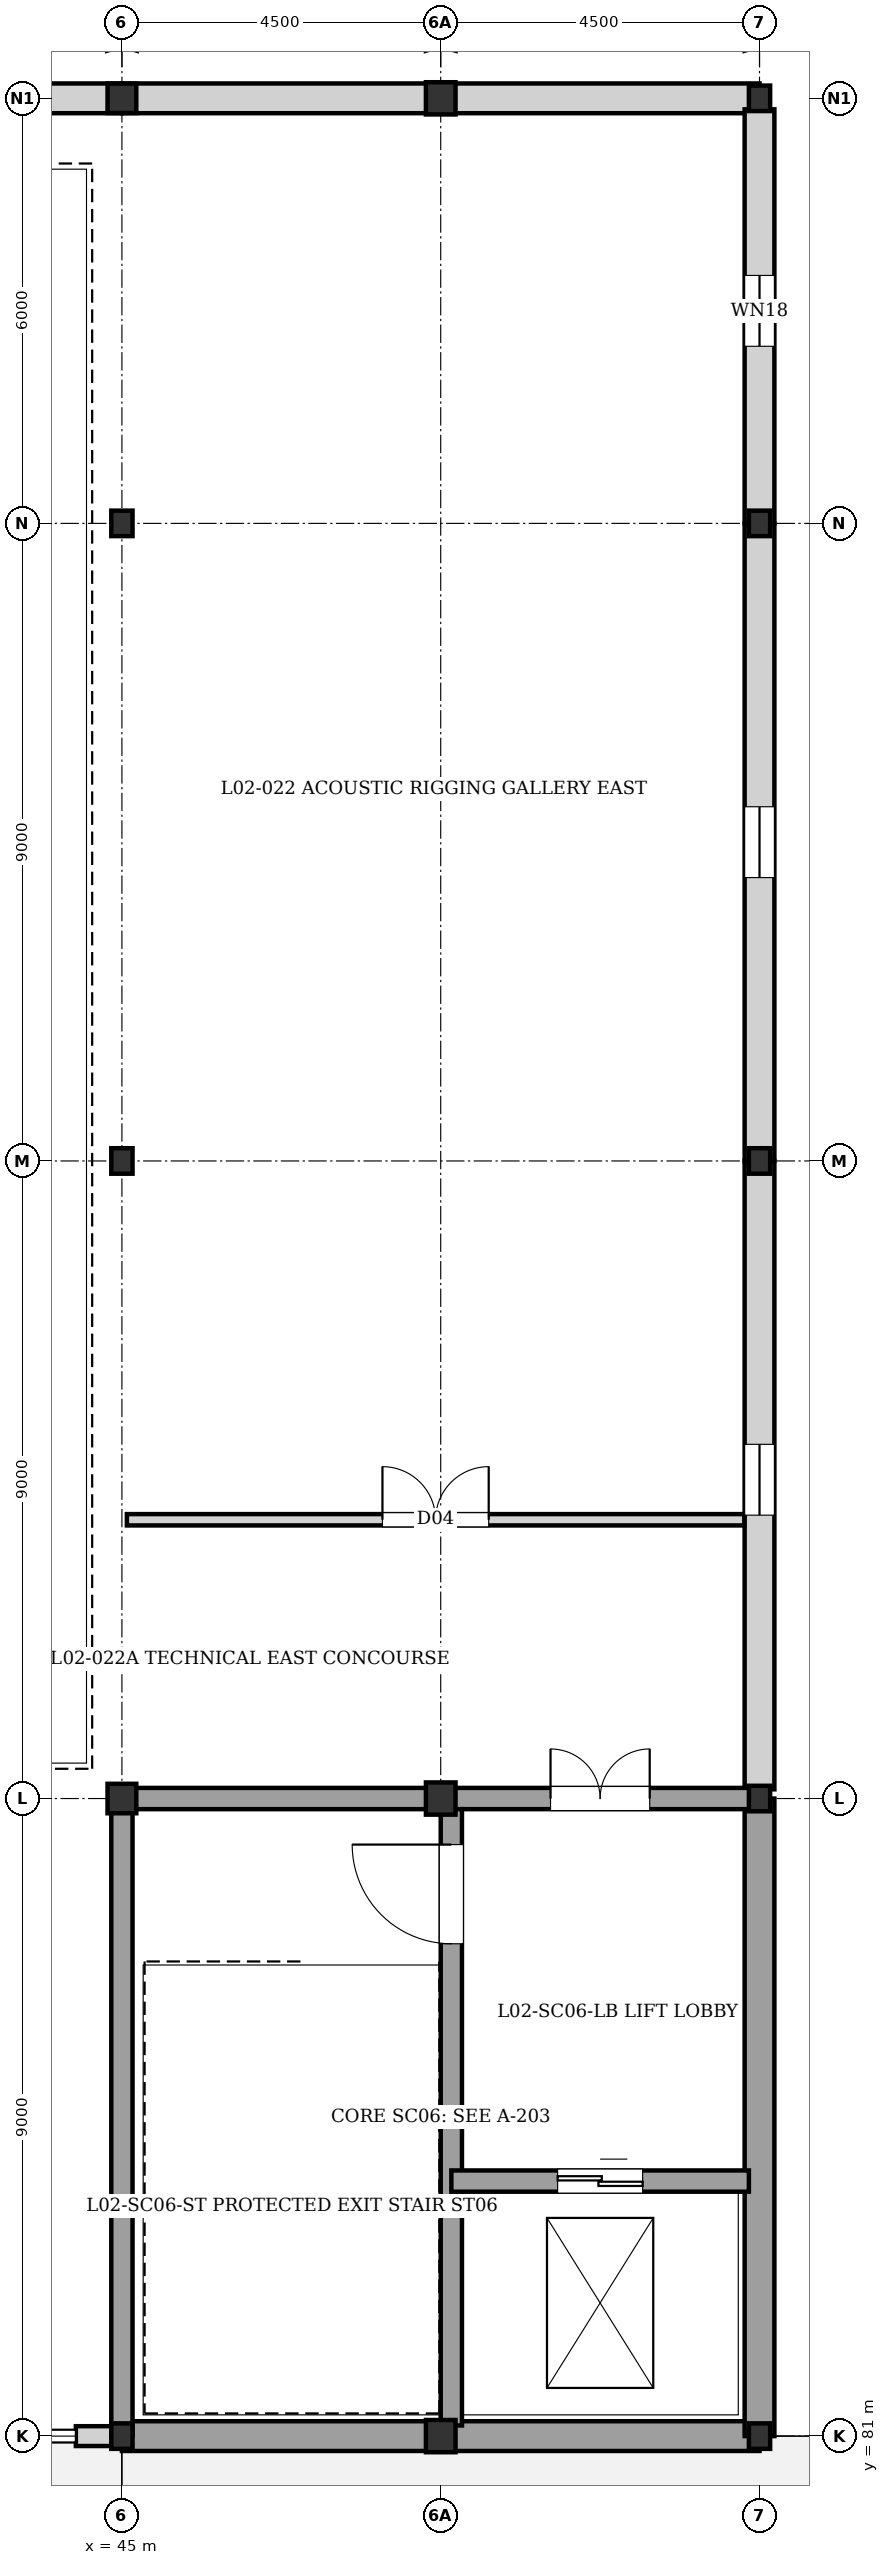
"""IFC4 building model, lengths in metres.
Left out: names, types, materials, properties, quantities, classifications, styles, units other than length and angle.
Written with IfcOpenShell. Run it as: python <this file> out.ifc"""

import sys

from ifc_helpers import new_model, si_unit, direction, frame, frame_2d, origin, origin_2d, place, context, subcontext, project, spatial, rectangle, i_section, extrude, element, fill, save


model = new_model("IFC4")
c1 = context("Model", 3, precision=1e-05, world=origin(), true_north=direction((0.0, 1.0)))
c2 = subcontext(c1, "Body", "Model", "MODEL_VIEW")
j1 = project(units=[si_unit("LENGTHUNIT", "METRE"), si_unit("PLANEANGLEUNIT", "RADIAN")], contexts=[c1])
p1 = place(None, origin())
s1 = spatial("IfcSite", under=j1, at=p1, CompositionType="ELEMENT")
p2 = place(p1, origin())
s2 = spatial("IfcBuilding", under=s1, at=p2, CompositionType="ELEMENT")
p3 = place(p2, frame((0.0, 0.0, 8.16)))
s3 = spatial("IfcBuildingStorey", under=s2, at=p3, CompositionType="ELEMENT", Elevation=8.16)
p4 = place(p3, frame((45.0, 81.0, 0.0), z_axis=(0.0, 0.0, 1.0), x_axis=(1.0, 0.0, 0.0)))
e1 = element("IfcColumn", 1, at=p4, inside=s3, PredefinedType="COLUMN", context=c2, shape_type="SweptSolid", body=[
    extrude(i_section(OverallWidth=0.3, OverallDepth=0.36, WebThickness=0.012, FlangeThickness=0.022, at=origin_2d()), origin(), (0.0, 0.0, 1.0), 3.36),
])
p5 = place(p3, frame((45.0, 90.0, 0.0), z_axis=(0.0, 0.0, 1.0), x_axis=(1.0, 0.0, 0.0)))
e2 = element("IfcColumn", 2, at=p5, inside=s3, PredefinedType="COLUMN", context=c2, shape_type="SweptSolid", body=[
    extrude(i_section(OverallWidth=0.406, OverallDepth=0.416, WebThickness=0.022, FlangeThickness=0.038, at=origin_2d()), origin(), (0.0, 0.0, 1.0), 3.36),
])
for number, where, z_axis, x_axis in (
    (3, (45.0, 99.0, 0.0), (0.0, 0.0, 1.0), (1.0, 0.0, 0.0)),
    (4, (45.0, 108.0, 0.0), (0.0, 0.0, 1.0), (1.0, 0.0, 0.0)),
):
    element("IfcColumn", number, at=place(p3, frame(where, z_axis=z_axis, x_axis=x_axis)), inside=s3, PredefinedType="COLUMN", context=c2, shape_type="SweptSolid", body=[
        extrude(i_section(OverallWidth=0.3, OverallDepth=0.36, WebThickness=0.012, FlangeThickness=0.022, at=origin_2d()), origin(), (0.0, 0.0, 1.0), 3.36),
    ])
p6 = place(p3, frame((45.0, 114.0, 0.0), z_axis=(0.0, 0.0, 1.0), x_axis=(1.0, 0.0, 0.0)))
e5 = element("IfcColumn", 5, at=p6, inside=s3, PredefinedType="COLUMN", context=c2, shape_type="SweptSolid", body=[
    extrude(i_section(OverallWidth=0.406, OverallDepth=0.416, WebThickness=0.022, FlangeThickness=0.038, at=origin_2d()), origin(), (0.0, 0.0, 1.0), 3.36),
])
for number, where, z_axis, x_axis in (
    (6, (54.0, 81.0, 0.0), (0.0, 0.0, 1.0), (1.0, 0.0, 0.0)),
    (7, (54.0, 90.0, 0.0), (0.0, 0.0, 1.0), (1.0, 0.0, 0.0)),
    (8, (54.0, 99.0, 0.0), (0.0, 0.0, 1.0), (1.0, 0.0, 0.0)),
    (9, (54.0, 108.0, 0.0), (0.0, 0.0, 1.0), (1.0, 0.0, 0.0)),
    (10, (54.0, 114.0, 0.0), (0.0, 0.0, 1.0), (1.0, 0.0, 0.0)),
):
    element("IfcColumn", number, at=place(p3, frame(where, z_axis=z_axis, x_axis=x_axis)), inside=s3, PredefinedType="COLUMN", context=c2, shape_type="SweptSolid", body=[
        extrude(i_section(OverallWidth=0.3, OverallDepth=0.36, WebThickness=0.012, FlangeThickness=0.022, at=origin_2d()), origin(), (0.0, 0.0, 1.0), 3.36),
    ])
for number, where, z_axis, x_axis in (
    (11, (49.5, 81.0, 2.82), (0.0, 0.0, 1.0), (1.0, 0.0, 0.0)),
    (12, (49.5, 90.0, 2.82), (0.0, 0.0, 1.0), (1.0, 0.0, 0.0)),
    (13, (49.5, 114.0, 2.82), (0.0, 0.0, 1.0), (1.0, 0.0, 0.0)),
):
    element("IfcColumn", number, at=place(p3, frame(where, z_axis=z_axis, x_axis=x_axis)), inside=s3, PredefinedType="COLUMN", context=c2, shape_type="SweptSolid", body=[
        extrude(i_section(OverallWidth=0.418, OverallDepth=0.455, WebThickness=0.032, FlangeThickness=0.056, at=origin_2d()), origin(), (0.0, 0.0, 1.0), 1.005),
    ])
p7 = place(p3, frame((54.0, 81.0, 0.0), z_axis=(0.0, 0.0, 1.0), x_axis=(-1.0, 0.0, 0.0)))
e14 = element("IfcWall", 14, at=p7, inside=s3, PredefinedType="SOLIDWALL", context=c2, shape_type="SweptSolid", body=[
    extrude(rectangle(XDim=9.0, YDim=0.42, at=frame_2d((4.5, 0.0))), origin(), (0.0, 0.0, 1.0), 3.11),
])
p8 = place(p3, frame((44.87, 81.0, 0.0), z_axis=(0.0, 0.0, 1.0), x_axis=(-1.0, 0.0, 0.0)))
e15 = element("IfcWall", 15, at=p8, inside=s3, PredefinedType="SOLIDWALL", context=c2, shape_type="SweptSolid", body=[
    extrude(rectangle(XDim=0.52, YDim=0.28, at=frame_2d((0.26, 0.0))), origin(), (0.0, 0.0, 1.0), 2.035),
])
for number, where, z_axis, x_axis in (
    (16, (36.0, 114.0, 0.0), (0.0, 0.0, 1.0), (1.0, 0.0, 0.0)),
    (17, (45.0, 114.0, 0.0), (0.0, 0.0, 1.0), (1.0, 0.0, 0.0)),
):
    element("IfcWall", number, at=place(p3, frame(where, z_axis=z_axis, x_axis=x_axis)), inside=s3, PredefinedType="SOLIDWALL", context=c2, shape_type="SweptSolid", body=[
        extrude(rectangle(XDim=9.0, YDim=0.42, at=frame_2d((4.5, 0.0))), origin(), (0.0, 0.0, 1.0), 2.035),
    ])
p9 = place(p3, frame((54.0, 113.845, 0.0), z_axis=(0.0, 0.0, 1.0), x_axis=(0.0, -1.0, 0.0)))
e18 = element("IfcWall", 18, at=p9, inside=s3, PredefinedType="SOLIDWALL", context=c2, shape_type="SweptSolid", body=[
    extrude(rectangle(XDim=5.845, YDim=0.42, at=frame_2d((2.922, 0.0))), origin(), (0.0, 0.0, 1.0), 2.8),
])
p10 = place(p9, frame((2.345, 0.0, 0.4)))
e19 = element("IfcOpeningElement", 19, at=p10, cuts=e18, PredefinedType="OPENING", context=c2, shape_type="SweptSolid", body=[
    extrude(rectangle(XDim=1.0, YDim=1.6, at=frame_2d((0.5, 0.8))), frame((0.0, 0.22, 0.0), z_axis=(0.0, -1.0, 0.0), x_axis=(1.0, 0.0, 0.0)), (0.0, 0.0, 1.0), 0.44),
])
p11 = place(p3, frame((54.0, 108.0, 0.0), z_axis=(0.0, 0.0, 1.0), x_axis=(0.0, -1.0, 0.0)))
e20 = element("IfcWall", 20, at=p11, inside=s3, PredefinedType="SOLIDWALL", context=c2, shape_type="SweptSolid", body=[
    extrude(rectangle(XDim=9.0, YDim=0.42, at=frame_2d((4.5, 0.0))), origin(), (0.0, 0.0, 1.0), 3.11),
])
p12 = place(p11, frame((4.0, 0.0, 0.4)))
e21 = element("IfcOpeningElement", 21, at=p12, cuts=e20, PredefinedType="OPENING", context=c2, shape_type="SweptSolid", body=[
    extrude(rectangle(XDim=1.0, YDim=1.6, at=frame_2d((0.5, 0.8))), frame((0.0, 0.22, 0.0), z_axis=(0.0, -1.0, 0.0), x_axis=(1.0, 0.0, 0.0)), (0.0, 0.0, 1.0), 0.44),
])
p13 = place(p3, frame((54.0, 99.0, 0.0), z_axis=(0.0, 0.0, 1.0), x_axis=(0.0, -1.0, 0.0)))
e22 = element("IfcWall", 22, at=p13, inside=s3, PredefinedType="SOLIDWALL", context=c2, shape_type="SweptSolid", body=[
    extrude(rectangle(XDim=8.87, YDim=0.42, at=frame_2d((4.435, 0.0))), origin(), (0.0, 0.0, 1.0), 2.7),
])
p14 = place(p13, frame((4.0, 0.0, 0.4)))
e23 = element("IfcOpeningElement", 23, at=p14, cuts=e22, PredefinedType="OPENING", context=c2, shape_type="SweptSolid", body=[
    extrude(rectangle(XDim=1.0, YDim=1.6, at=frame_2d((0.5, 0.8))), frame((0.0, 0.22, 0.0), z_axis=(0.0, -1.0, 0.0), x_axis=(1.0, 0.0, 0.0)), (0.0, 0.0, 1.0), 0.44),
])
p15 = place(p3, frame((54.0, 90.0, 0.0), z_axis=(0.0, 0.0, 1.0), x_axis=(0.0, -1.0, 0.0)))
e24 = element("IfcWall", 24, at=p15, inside=s3, PredefinedType="SOLIDWALL", context=c2, shape_type="SweptSolid", body=[
    extrude(rectangle(XDim=9.0, YDim=0.42, at=frame_2d((4.5, 0.0))), origin(), (0.0, 0.0, 1.0), 3.11),
])
p16 = place(p3, frame((45.0, 90.0, 0.0), z_axis=(0.0, 0.0, 1.0), x_axis=(1.0, 0.0, 0.0)))
e25 = element("IfcWall", 25, at=p16, inside=s3, PredefinedType="SHEAR", context=c2, shape_type="SweptSolid", body=[
    extrude(rectangle(XDim=9.0, YDim=0.3, at=frame_2d((4.5, 0.0))), origin(), (0.0, 0.0, 1.0), 3.11),
])
p17 = place(p16, frame((6.05, 0.0, 0.0)))
e26 = element("IfcOpeningElement", 26, at=p17, cuts=e25, PredefinedType="OPENING", context=c2, shape_type="SweptSolid", body=[
    extrude(rectangle(XDim=1.4, YDim=2.02, at=frame_2d((0.7, 1.01))), frame((0.0, 0.16, 0.0), z_axis=(0.0, -1.0, 0.0), x_axis=(1.0, 0.0, 0.0)), (0.0, 0.0, 1.0), 0.32),
])
p18 = place(p3, frame((45.0, 81.0, 0.0), z_axis=(0.0, 0.0, 1.0), x_axis=(0.0, 1.0, 0.0)))
e27 = element("IfcWall", 27, at=p18, inside=s3, PredefinedType="SHEAR", context=c2, shape_type="SweptSolid", body=[
    extrude(rectangle(XDim=9.0, YDim=0.3, at=frame_2d((4.5, 0.0))), origin(), (0.0, 0.0, 1.0), 3.11),
])
p19 = place(p3, frame((49.65, 81.15, 0.0), z_axis=(0.0, 0.0, 1.0), x_axis=(0.0, 1.0, 0.0)))
e28 = element("IfcWall", 28, at=p19, inside=s3, PredefinedType="SHEAR", context=c2, shape_type="SweptSolid", body=[
    extrude(rectangle(XDim=8.7, YDim=0.3, at=frame_2d((4.35, 0.0))), origin(), (0.0, 0.0, 1.0), 3.11),
])
p20 = place(p19, frame((6.8, 0.0, 0.0)))
e29 = element("IfcOpeningElement", 29, at=p20, cuts=e28, PredefinedType="OPENING", context=c2, shape_type="SweptSolid", body=[
    extrude(rectangle(XDim=1.4, YDim=2.02, at=frame_2d((0.7, 1.01))), frame((0.0, 0.16, 0.0), z_axis=(0.0, -1.0, 0.0), x_axis=(1.0, 0.0, 0.0)), (0.0, 0.0, 1.0), 0.32),
])
p21 = place(p3, frame((49.65, 84.6, 0.0), z_axis=(0.0, 0.0, 1.0), x_axis=(1.0, 0.0, 0.0)))
e30 = element("IfcWall", 30, at=p21, inside=s3, PredefinedType="SHEAR", context=c2, shape_type="SweptSolid", body=[
    extrude(rectangle(XDim=4.2, YDim=0.3, at=frame_2d((2.1, 0.0))), origin(), (0.0, 0.0, 1.0), 3.11),
])
p22 = place(p21, frame((1.5, 0.0, 0.0)))
e31 = element("IfcOpeningElement", 31, at=p22, cuts=e30, PredefinedType="OPENING", context=c2, shape_type="SweptSolid", body=[
    extrude(rectangle(XDim=1.2, YDim=2.2, at=frame_2d((0.6, 1.1))), frame((0.0, 0.16, 0.0), z_axis=(0.0, -1.0, 0.0), x_axis=(1.0, 0.0, 0.0)), (0.0, 0.0, 1.0), 0.32),
])
p23 = place(p3, frame((45.07, 93.935, 0.0), z_axis=(0.0, 0.0, 1.0), x_axis=(1.0, 0.0, 0.0)))
e32 = element("IfcWall", 32, at=p23, inside=s3, PredefinedType="PARTITIONING", context=c2, shape_type="SweptSolid", body=[
    extrude(rectangle(XDim=8.715, YDim=0.16, at=frame_2d((4.357, 0.0))), origin(), (0.0, 0.0, 1.0), 3.11),
])
p24 = place(p23, frame((3.607, 0.0, 0.0)))
e33 = element("IfcOpeningElement", 33, at=p24, cuts=e32, PredefinedType="OPENING", context=c2, shape_type="SweptSolid", body=[
    extrude(rectangle(XDim=1.5, YDim=2.1, at=frame_2d((0.75, 1.05))), frame((0.0, 0.09, 0.0), z_axis=(0.0, -1.0, 0.0), x_axis=(1.0, 0.0, 0.0)), (0.0, 0.0, 1.0), 0.18),
])
p25 = place(p10, origin())
e34 = element("IfcWindow", 34, at=p25, inside=s3, PartitioningType="SINGLE_PANEL", PredefinedType="WINDOW", context=c2, shape_type="SweptSolid", body=[
    extrude(rectangle(XDim=1.0, YDim=1.6, at=frame_2d((0.5, 0.8))), frame((0.0, 0.03, 0.0), z_axis=(0.0, -1.0, 0.0), x_axis=(1.0, 0.0, 0.0)), (0.0, 0.0, 1.0), 0.06),
])
fill(e19, e34)
p26 = place(p12, origin())
e35 = element("IfcWindow", 35, at=p26, inside=s3, PartitioningType="SINGLE_PANEL", PredefinedType="WINDOW", context=c2, shape_type="SweptSolid", body=[
    extrude(rectangle(XDim=1.0, YDim=1.6, at=frame_2d((0.5, 0.8))), frame((0.0, 0.03, 0.0), z_axis=(0.0, -1.0, 0.0), x_axis=(1.0, 0.0, 0.0)), (0.0, 0.0, 1.0), 0.06),
])
fill(e21, e35)
p27 = place(p14, origin())
e36 = element("IfcWindow", 36, at=p27, inside=s3, PartitioningType="SINGLE_PANEL", PredefinedType="WINDOW", context=c2, shape_type="SweptSolid", body=[
    extrude(rectangle(XDim=1.0, YDim=1.6, at=frame_2d((0.5, 0.8))), frame((0.0, 0.03, 0.0), z_axis=(0.0, -1.0, 0.0), x_axis=(1.0, 0.0, 0.0)), (0.0, 0.0, 1.0), 0.06),
])
fill(e23, e36)
p28 = place(p17, origin())
e37 = element("IfcDoor", 37, at=p28, inside=s3, OperationType="DOUBLE_DOOR_SINGLE_SWING", PredefinedType="DOOR", context=c2, shape_type="SweptSolid", body=[
    extrude(rectangle(XDim=1.4, YDim=2.02, at=frame_2d((0.7, 1.01))), frame((0.0, 0.025, 0.0), z_axis=(0.0, -1.0, 0.0), x_axis=(1.0, 0.0, 0.0)), (0.0, 0.0, 1.0), 0.05),
])
fill(e26, e37)
p29 = place(p20, origin())
e38 = element("IfcDoor", 38, at=p29, inside=s3, OperationType="SINGLE_SWING_RIGHT", PredefinedType="DOOR", context=c2, shape_type="SweptSolid", body=[
    extrude(rectangle(XDim=1.4, YDim=2.02, at=frame_2d((0.7, 1.01))), frame((0.0, 0.025, 0.0), z_axis=(0.0, -1.0, 0.0), x_axis=(1.0, 0.0, 0.0)), (0.0, 0.0, 1.0), 0.05),
])
fill(e29, e38)
p30 = place(p22, origin())
e39 = element("IfcDoor", 39, at=p30, inside=s3, OperationType="DOUBLE_DOOR_SLIDING", PredefinedType="DOOR", context=c2, shape_type="SweptSolid", body=[
    extrude(rectangle(XDim=1.2, YDim=2.2, at=frame_2d((0.6, 1.1))), frame((0.0, 0.025, 0.0), z_axis=(0.0, -1.0, 0.0), x_axis=(1.0, 0.0, 0.0)), (0.0, 0.0, 1.0), 0.05),
])
fill(e31, e39)
p31 = place(p24, origin())
e40 = element("IfcDoor", 40, at=p31, inside=s3, OperationType="DOUBLE_DOOR_SINGLE_SWING", PredefinedType="DOOR", context=c2, shape_type="SweptSolid", body=[
    extrude(rectangle(XDim=1.5, YDim=2.1, at=frame_2d((0.75, 1.05))), frame((0.0, 0.025, 0.0), z_axis=(0.0, -1.0, 0.0), x_axis=(1.0, 0.0, 0.0)), (0.0, 0.0, 1.0), 0.05),
])
fill(e33, e40)
save(model, sys.argv[1])
